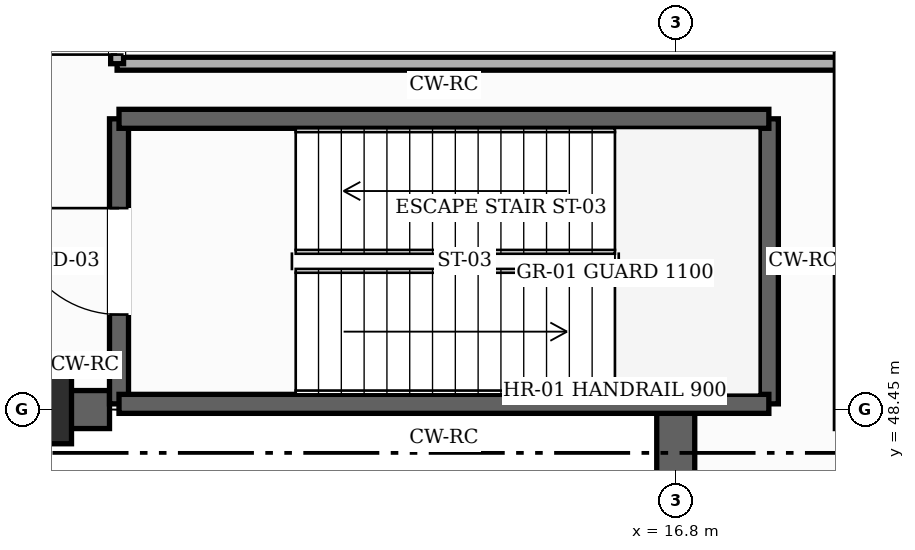
"""IFC4 building model, lengths in metres.
Left out: names, types, materials, properties, quantities, classifications, styles, units other than length and angle.
Written with IfcOpenShell. Run it as: python <this file> out.ifc"""

import sys

from ifc_helpers import new_model, si_unit, direction, frame, frame_2d, origin, origin_2d, place, context, subcontext, project, spatial, rectangle, hollow_rectangle, extrude, element, fill, save


model = new_model("IFC4")
c1 = context("Model", 3, precision=1e-05, world=origin(), true_north=direction((0.0, 1.0)))
c2 = subcontext(c1, "Body", "Model", "MODEL_VIEW")
j1 = project(units=[si_unit("LENGTHUNIT", "METRE"), si_unit("PLANEANGLEUNIT", "RADIAN")], contexts=[c1])
p1 = place(None, origin())
s1 = spatial("IfcSite", under=j1, at=p1, CompositionType="ELEMENT")
p2 = place(p1, origin())
s2 = spatial("IfcBuilding", under=s1, at=p2, CompositionType="ELEMENT")
p3 = place(p2, frame((0.0, 0.0, -5.4)))
s3 = spatial("IfcBuildingStorey", under=s2, at=p3, CompositionType="ELEMENT", Elevation=-5.4)
p4 = place(p3, frame((0.0, 48.45, 0.0), z_axis=(0.0, 0.0, 1.0), x_axis=(1.0, 0.0, 0.0)))
e1 = element("IfcWall", 1, at=p4, inside=s3, PredefinedType="USERDEFINED", context=c2, shape_type="SweptSolid", body=[
    extrude(rectangle(XDim=9.35, YDim=0.5, at=frame_2d((4.675, 0.0))), origin(), (0.0, 0.0, 1.0), 5.4),
])
p5 = place(p3, frame((16.8, 48.45, 0.0), z_axis=(0.0, 0.0, 1.0), x_axis=(0.0, -1.0, 0.0)))
e2 = element("IfcWall", 2, at=p5, inside=s3, PredefinedType="USERDEFINED", context=c2, shape_type="SweptSolid", body=[
    extrude(rectangle(XDim=16.45, YDim=0.5, at=frame_2d((8.225, 0.0))), origin(), (0.0, 0.0, 1.0), 5.4),
])
p6 = place(p3, frame((8.4, 48.45, 0.0), z_axis=(0.0, 0.0, 1.0), x_axis=(1.0, 0.0, 0.0)))
e3 = element("IfcColumn", 3, at=p6, inside=s3, PredefinedType="COLUMN", context=c2, shape_type="SweptSolid", body=[
    extrude(hollow_rectangle(XDim=0.9, YDim=0.9, WallThickness=0.032, InnerFilletRadius=0.032, OuterFilletRadius=0.064, at=origin_2d()), origin(), (0.0, 0.0, 1.0), 5.4),
])
p7 = place(p3, frame((9.475, 48.525, 0.0), z_axis=(0.0, 0.0, 1.0), x_axis=(0.0, 1.0, 0.0)))
e4 = element("IfcWall", 4, at=p7, inside=s3, PredefinedType="SHEAR", context=c2, shape_type="SweptSolid", body=[
    extrude(rectangle(XDim=3.75, YDim=0.25, at=frame_2d((1.875, 0.0))), origin(), (0.0, 0.0, 1.0), 5.12),
])
p8 = place(p7, frame((1.175, 0.0, 0.0)))
e5 = element("IfcOpeningElement", 5, at=p8, cuts=e4, PredefinedType="OPENING", context=c2, shape_type="SweptSolid", body=[
    extrude(rectangle(XDim=1.4, YDim=2.25, at=frame_2d((0.7, 1.125))), frame((0.0, 0.135, 0.0), z_axis=(0.0, -1.0, 0.0), x_axis=(1.0, 0.0, 0.0)), (0.0, 0.0, 1.0), 0.27),
])
p9 = place(p3, frame((18.025, 52.275, 0.0), z_axis=(0.0, 0.0, 1.0), x_axis=(0.0, -1.0, 0.0)))
e6 = element("IfcWall", 6, at=p9, inside=s3, PredefinedType="SHEAR", context=c2, shape_type="SweptSolid", body=[
    extrude(rectangle(XDim=3.75, YDim=0.25, at=frame_2d((1.875, 0.0))), origin(), (0.0, 0.0, 1.0), 5.12),
])
for number, where, z_axis, x_axis in (
    (7, (18.025, 48.525, 0.0), (0.0, 0.0, 1.0), (-1.0, 0.0, 0.0)),
    (8, (9.475, 52.275, 0.0), (0.0, 0.0, 1.0), (1.0, 0.0, 0.0)),
):
    element("IfcWall", number, at=place(p3, frame(where, z_axis=z_axis, x_axis=x_axis)), inside=s3, PredefinedType="SHEAR", context=c2, shape_type="SweptSolid", body=[
        extrude(rectangle(XDim=8.55, YDim=0.25, at=frame_2d((4.275, 0.0))), origin(), (0.0, 0.0, 1.0), 5.12),
    ])
p10 = place(p3, frame((9.45, 53.0, 0.0), z_axis=(0.0, 0.0, 1.0), x_axis=(1.0, 0.0, 0.0)))
e9 = element("IfcWall", 9, at=p10, inside=s3, PredefinedType="PARTITIONING", context=c2, shape_type="SweptSolid", body=[
    extrude(rectangle(XDim=9.55, YDim=0.17, at=frame_2d((4.775, 0.0))), origin(), (0.0, 0.0, 1.0), 5.105),
])
p11 = place(p3, frame((9.45, 53.0, 0.0), z_axis=(0.0, 0.0, 1.0), x_axis=(0.0, 1.0, 0.0)))
e10 = element("IfcWall", 10, at=p11, inside=s3, PredefinedType="PARTITIONING", context=c2, shape_type="SweptSolid", body=[
    extrude(rectangle(XDim=21.0, YDim=0.17, at=frame_2d((10.5, 0.0))), origin(), (0.0, 0.0, 1.0), 5.105),
])
p12 = place(p11, frame((0.12, 0.0, 0.0)))
e11 = element("IfcOpeningElement", 11, at=p12, cuts=e10, PredefinedType="OPENING", context=c2, shape_type="SweptSolid", body=[
    extrude(rectangle(XDim=1.2, YDim=2.2, at=frame_2d((0.6, 1.1))), frame((0.0, 0.095, 0.0), z_axis=(0.0, -1.0, 0.0), x_axis=(1.0, 0.0, 0.0)), (0.0, 0.0, 1.0), 0.19),
])
p13 = place(p8, origin())
e12 = element("IfcDoor", 12, at=p13, inside=s3, OperationType="SINGLE_SWING_RIGHT", PredefinedType="DOOR", context=c2, shape_type="SweptSolid", body=[
    extrude(rectangle(XDim=1.4, YDim=2.25, at=frame_2d((0.7, 1.125))), frame((0.0, 0.025, 0.0), z_axis=(0.0, -1.0, 0.0), x_axis=(1.0, 0.0, 0.0)), (0.0, 0.0, 1.0), 0.05),
])
fill(e5, e12)
p14 = place(p12, origin())
e13 = element("IfcDoor", 13, at=p14, inside=s3, OperationType="SINGLE_SWING_LEFT", PredefinedType="DOOR", context=c2, shape_type="SweptSolid", body=[
    extrude(rectangle(XDim=1.2, YDim=2.2, at=frame_2d((0.6, 1.1))), frame((0.0, 0.025, 0.0), z_axis=(0.0, -1.0, 0.0), x_axis=(1.0, 0.0, 0.0)), (0.0, 0.0, 1.0), 0.05),
])
fill(e11, e13)
save(model, sys.argv[1])
